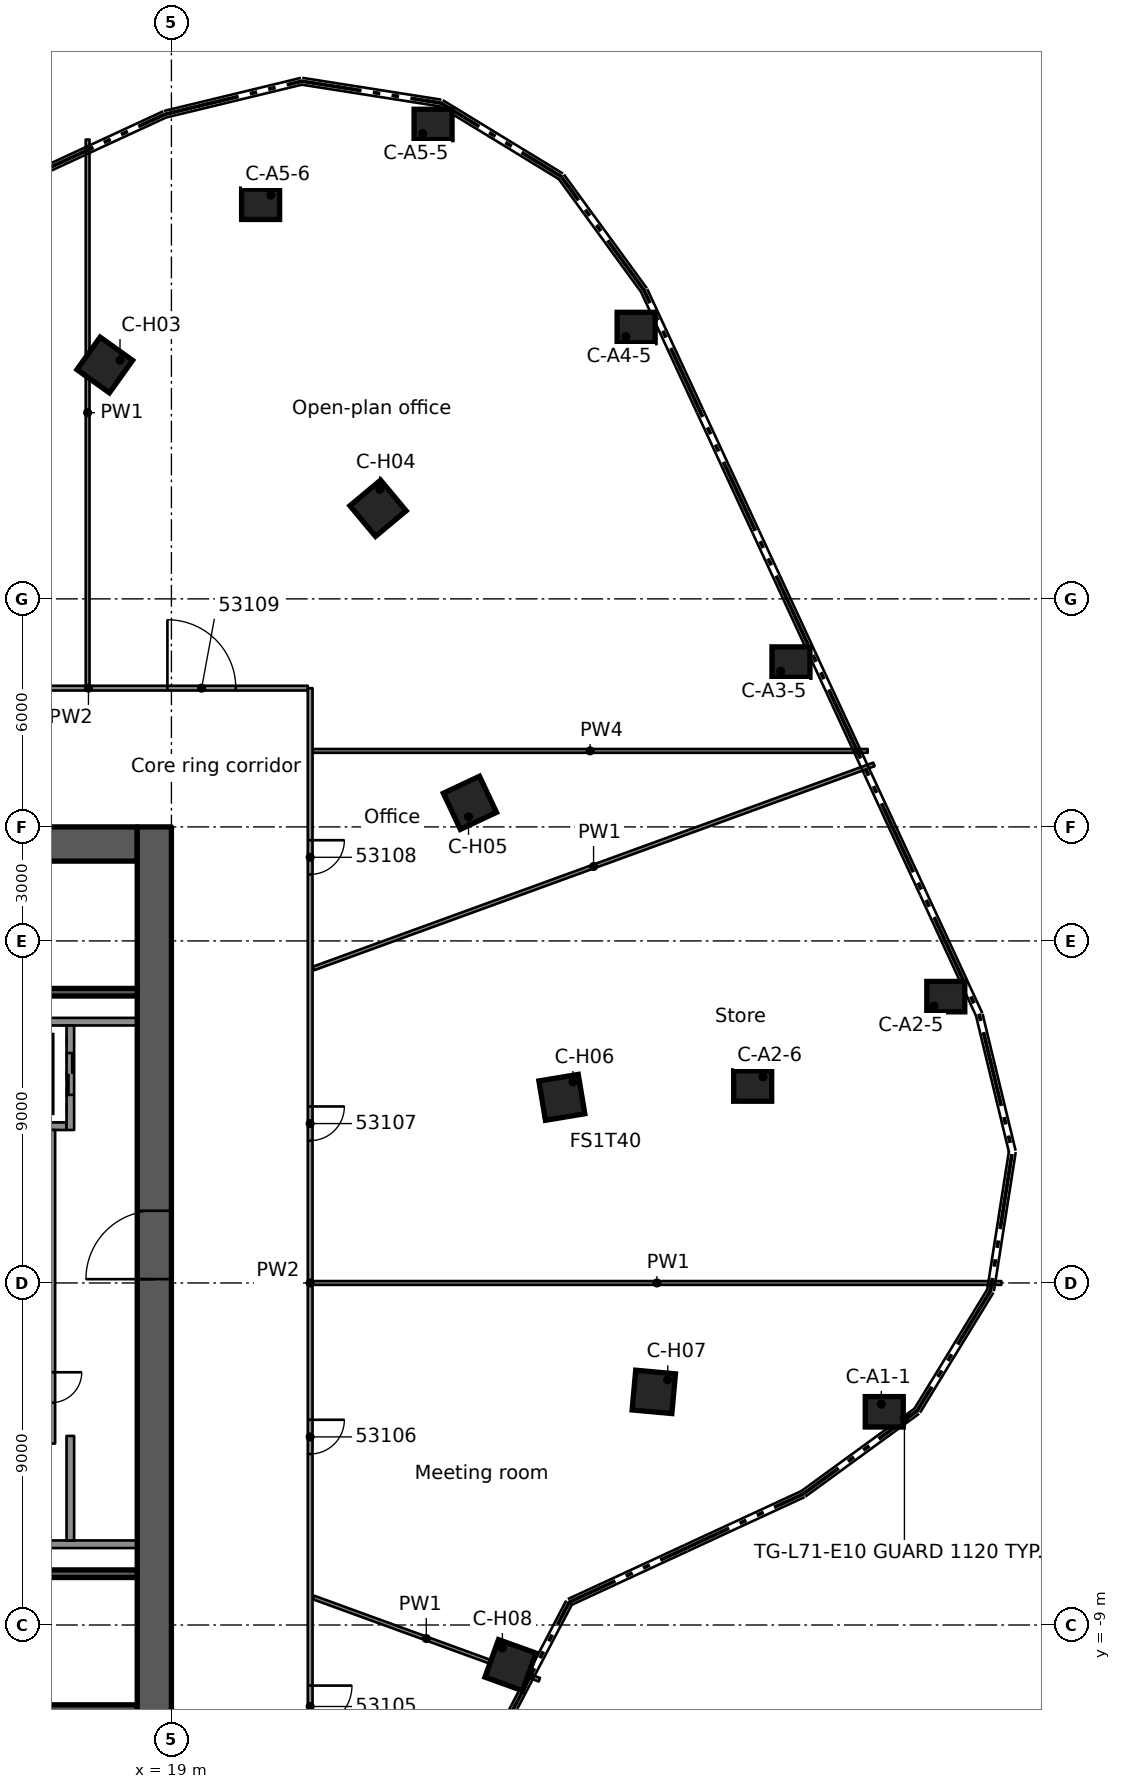
"""IFC4 building model, lengths in metres.
Left out: names, types, materials, properties, quantities, classifications, styles, units other than length and angle.
Written with IfcOpenShell. Run it as: python <this file> out.ifc"""

import sys

from ifc_helpers import new_model, si_unit, direction, frame, frame_2d, origin, origin_2d, place, context, subcontext, project, spatial, rectangle, extrude, element, fill, save


model = new_model("IFC4")
c1 = context("Model", 3, precision=1e-05, world=origin(), true_north=direction((0.0, 1.0)))
c2 = subcontext(c1, "Body", "Model", "MODEL_VIEW")
j1 = project(units=[si_unit("LENGTHUNIT", "METRE"), si_unit("PLANEANGLEUNIT", "RADIAN")], contexts=[c1])
p1 = place(None, origin())
s1 = spatial("IfcSite", under=j1, at=p1, CompositionType="ELEMENT")
p2 = place(p1, origin())
s2 = spatial("IfcBuilding", under=s1, at=p2, CompositionType="ELEMENT")
p3 = place(p2, frame((0.0, 0.0, 267.5)))
s3 = spatial("IfcBuildingStorey", under=s2, at=p3, CompositionType="ELEMENT", Elevation=267.5)
p4 = place(p3, frame((8.9, 11.55, 0.0), z_axis=(0.0, 0.0, 1.0), x_axis=(1.0, 0.0, 0.0)))
e1 = element("IfcWall", 1, at=p4, inside=s3, PredefinedType="SHEAR", context=c2, shape_type="SweptSolid", body=[
    extrude(rectangle(XDim=9.2, YDim=0.9, at=frame_2d((4.6, 0.0))), origin(), (0.0, 0.0, 1.0), 3.5),
])
p5 = place(p4, frame((0.5, 0.0, 0.0)))
e2 = element("IfcOpeningElement", 2, at=p5, cuts=e1, PredefinedType="OPENING", context=c2, shape_type="SweptSolid", body=[
    extrude(rectangle(XDim=1.8, YDim=2.1, at=frame_2d((0.9, 1.05))), frame((0.0, 0.46, 0.0), z_axis=(0.0, -1.0, 0.0), x_axis=(1.0, 0.0, 0.0)), (0.0, 0.0, 1.0), 0.92),
])
p6 = place(p4, frame((3.0, 0.0, 0.0)))
e3 = element("IfcOpeningElement", 3, at=p6, cuts=e1, PredefinedType="OPENING", context=c2, shape_type="SweptSolid", body=[
    extrude(rectangle(XDim=1.1, YDim=2.1, at=frame_2d((0.55, 1.05))), frame((0.0, 0.46, 0.0), z_axis=(0.0, -1.0, 0.0), x_axis=(1.0, 0.0, 0.0)), (0.0, 0.0, 1.0), 0.92),
])
p7 = place(p3, frame((8.9, -11.55, 0.0), z_axis=(0.0, 0.0, 1.0), x_axis=(1.0, 0.0, 0.0)))
e4 = element("IfcWall", 4, at=p7, inside=s3, PredefinedType="SHEAR", context=c2, shape_type="SweptSolid", body=[
    extrude(rectangle(XDim=9.2, YDim=0.9, at=frame_2d((4.6, 0.0))), origin(), (0.0, 0.0, 1.0), 3.5),
])
p8 = place(p7, frame((0.85, 0.0, 0.0)))
e5 = element("IfcOpeningElement", 5, at=p8, cuts=e4, PredefinedType="OPENING", context=c2, shape_type="SweptSolid", body=[
    extrude(rectangle(XDim=1.1, YDim=2.1, at=frame_2d((0.55, 1.05))), frame((0.0, 0.46, 0.0), z_axis=(0.0, -1.0, 0.0), x_axis=(1.0, 0.0, 0.0)), (0.0, 0.0, 1.0), 0.92),
])
p9 = place(p7, frame((3.0, 0.0, 0.0)))
e6 = element("IfcOpeningElement", 6, at=p9, cuts=e4, PredefinedType="OPENING", context=c2, shape_type="SweptSolid", body=[
    extrude(rectangle(XDim=1.1, YDim=2.1, at=frame_2d((0.55, 1.05))), frame((0.0, 0.46, 0.0), z_axis=(0.0, -1.0, 0.0), x_axis=(1.0, 0.0, 0.0)), (0.0, 0.0, 1.0), 0.92),
])
p10 = place(p3, frame((18.55, -12.0, 0.0), z_axis=(0.0, 0.0, 1.0), x_axis=(0.0, 1.0, 0.0)))
e7 = element("IfcWall", 7, at=p10, inside=s3, PredefinedType="SHEAR", context=c2, shape_type="SweptSolid", body=[
    extrude(rectangle(XDim=24.0, YDim=0.9, at=frame_2d((12.0, 0.0))), origin(), (0.0, 0.0, 1.0), 3.5),
])
p11 = place(p10, frame((12.1, 0.0, 0.0)))
e8 = element("IfcOpeningElement", 8, at=p11, cuts=e7, PredefinedType="OPENING", context=c2, shape_type="SweptSolid", body=[
    extrude(rectangle(XDim=1.8, YDim=2.1, at=frame_2d((0.9, 1.05))), frame((0.0, 0.46, 0.0), z_axis=(0.0, -1.0, 0.0), x_axis=(1.0, 0.0, 0.0)), (0.0, 0.0, 1.0), 0.92),
])
for number, where, z_axis, x_axis in (
    (9, (37.758, -3.39, 0.0), (0.0, 0.0, 1.0), (1.0, 0.0, 0.0)),
    (10, (39.377, 7.534, 0.0), (0.0, 0.0, 1.0), (1.0, 0.0, 0.0)),
    (11, (34.295, 5.182, 0.0), (0.0, 0.0, 1.0), (1.0, 0.0, 0.0)),
    (12, (35.303, 16.337, 0.0), (0.0, 0.0, 1.0), (1.0, 0.0, 0.0)),
    (13, (31.229, 25.14, 0.0), (0.0, 0.0, 1.0), (1.0, 0.0, 0.0)),
    (14, (25.885, 30.483, 0.0), (0.0, 0.0, 1.0), (1.0, 0.0, 0.0)),
    (15, (21.347, 28.383, 0.0), (0.0, 0.0, 1.0), (1.0, 0.0, 0.0)),
):
    element("IfcColumn", number, at=place(p3, frame(where, z_axis=z_axis, x_axis=x_axis)), inside=s3, PredefinedType="COLUMN", context=c2, shape_type="SweptSolid", body=[
        extrude(rectangle(XDim=1.0, YDim=0.8, at=origin_2d()), origin(), (0.0, 0.0, 1.0), 3.5),
    ])
for number, where, z_axis, x_axis in (
    (16, (17.246, 24.154, 0.0), (0.0, 0.0, 1.0), (0.581, 0.814, 0.0)),
    (17, (24.437, 20.384, 0.0), (0.0, 0.0, 1.0), (0.768, 0.641, 0.0)),
    (18, (26.855, 12.634, 0.0), (0.0, 0.0, 1.0), (0.905, 0.426, 0.0)),
    (19, (29.274, 4.884, 0.0), (0.0, 0.0, 1.0), (0.986, 0.165, 0.0)),
    (20, (31.693, -2.866, 0.0), (0.0, 0.0, 1.0), (0.996, -0.09, 0.0)),
    (21, (27.923, -10.056, 0.0), (0.0, 0.0, 1.0), (0.941, -0.339, 0.0)),
):
    element("IfcColumn", number, at=place(p3, frame(where, z_axis=z_axis, x_axis=x_axis)), inside=s3, PredefinedType="COLUMN", context=c2, shape_type="SweptSolid", body=[
        extrude(rectangle(XDim=1.05, YDim=1.05, at=origin_2d()), origin(), (0.0, 0.0, 1.0), 3.5),
    ])
for number, where, z_axis, x_axis in (
    (22, (11.54, -6.875, 0.0), (0.0, 0.0, 1.0), (1.0, 0.0, 0.0)),
    (23, (11.54, 6.875, 0.0), (0.0, 0.0, 1.0), (1.0, 0.0, 0.0)),
):
    element("IfcWall", number, at=place(p3, frame(where, z_axis=z_axis, x_axis=x_axis)), inside=s3, PredefinedType="SOLIDWALL", context=c2, shape_type="SweptSolid", body=[
        extrude(rectangle(XDim=6.56, YDim=0.2, at=frame_2d((3.28, 0.0))), origin(), (0.0, 0.0, 1.0), 3.05),
    ])
p12 = place(p3, frame((11.54, 4.125, 0.0), z_axis=(0.0, 0.0, 1.0), x_axis=(1.0, 0.0, 0.0)))
e24 = element("IfcWall", 24, at=p12, inside=s3, PredefinedType="SOLIDWALL", context=c2, shape_type="SweptSolid", body=[
    extrude(rectangle(XDim=4.7, YDim=0.2, at=frame_2d((2.35, 0.0))), origin(), (0.0, 0.0, 1.0), 3.05),
])
p13 = place(p3, frame((16.34, 6.775, 0.0), z_axis=(0.0, 0.0, 1.0), x_axis=(0.0, -1.0, 0.0)))
e25 = element("IfcWall", 25, at=p13, inside=s3, PredefinedType="SOLIDWALL", context=c2, shape_type="SweptSolid", body=[
    extrude(rectangle(XDim=2.75, YDim=0.2, at=frame_2d((1.375, 0.0))), origin(), (0.0, 0.0, 1.0), 3.05),
])
p14 = place(p13, frame((0.725, 0.0, 0.0)))
e26 = element("IfcOpeningElement", 26, at=p14, cuts=e25, PredefinedType="OPENING", context=c2, shape_type="SweptSolid", body=[
    extrude(rectangle(XDim=1.1, YDim=2.1, at=frame_2d((0.55, 1.05))), frame((0.0, 0.11, 0.0), z_axis=(0.0, -1.0, 0.0), x_axis=(1.0, 0.0, 0.0)), (0.0, 0.0, 1.0), 0.22),
])
p15 = place(p3, frame((15.84, 4.025, 0.0), z_axis=(0.0, 0.0, 1.0), x_axis=(0.0, -1.0, 0.0)))
e27 = element("IfcWall", 27, at=p15, inside=s3, PredefinedType="SOLIDWALL", context=c2, shape_type="SweptSolid", body=[
    extrude(rectangle(XDim=8.25, YDim=0.2, at=frame_2d((4.125, 0.0))), origin(), (0.0, 0.0, 1.0), 3.05),
])
p16 = place(p15, frame((6.375, 0.0, 0.0)))
e28 = element("IfcOpeningElement", 28, at=p16, cuts=e27, PredefinedType="OPENING", context=c2, shape_type="SweptSolid", body=[
    extrude(rectangle(XDim=0.8, YDim=2.1, at=frame_2d((0.4, 1.05))), frame((0.0, 0.11, 0.0), z_axis=(0.0, -1.0, 0.0), x_axis=(1.0, 0.0, 0.0)), (0.0, 0.0, 1.0), 0.22),
])
p17 = place(p3, frame((16.34, -4.025, 0.0), z_axis=(0.0, 0.0, 1.0), x_axis=(0.0, -1.0, 0.0)))
e29 = element("IfcWall", 29, at=p17, inside=s3, PredefinedType="SOLIDWALL", context=c2, shape_type="SweptSolid", body=[
    extrude(rectangle(XDim=2.75, YDim=0.2, at=frame_2d((1.375, 0.0))), origin(), (0.0, 0.0, 1.0), 3.05),
])
for number, where, z_axis, x_axis in (
    (30, (11.54, -7.65, 0.0), (0.0, 0.0, 1.0), (1.0, 0.0, 0.0)),
    (31, (11.54, 7.65, 0.0), (0.0, 0.0, 1.0), (1.0, 0.0, 0.0)),
):
    element("IfcWall", number, at=place(p3, frame(where, z_axis=z_axis, x_axis=x_axis)), inside=s3, PredefinedType="SOLIDWALL", context=c2, shape_type="SweptSolid", body=[
        extrude(rectangle(XDim=6.56, YDim=0.2, at=frame_2d((3.28, 0.0))), origin(), (0.0, 0.0, 1.0), 3.05),
    ])
p18 = place(p3, frame((22.731, -8.273, 0.0), z_axis=(0.0, 0.0, 1.0), x_axis=(0.939689826278, -0.342027821076, 0.0)))
e32 = element("IfcWall", 32, at=p18, inside=s3, PredefinedType="PARTITIONING", context=c2, shape_type="SweptSolid", body=[
    extrude(rectangle(XDim=6.333, YDim=0.1, at=frame_2d((3.167, 0.0))), origin(), (0.0, 0.0, 1.0), 3.03),
])
p19 = place(p3, frame((22.713, 0.0, 0.0), z_axis=(0.0, 0.0, 1.0), x_axis=(1.0, 0.0, 0.0)))
e33 = element("IfcWall", 33, at=p19, inside=s3, PredefinedType="PARTITIONING", context=c2, shape_type="SweptSolid", body=[
    extrude(rectangle(XDim=18.125, YDim=0.1, at=frame_2d((9.062, 0.0))), origin(), (0.0, 0.0, 1.0), 3.03),
])
p20 = place(p3, frame((22.713, 14.0, 0.0), z_axis=(0.0, 0.0, 1.0), x_axis=(1.0, 0.0, 0.0)))
e34 = element("IfcWall", 34, at=p20, inside=s3, PredefinedType="PARTITIONING", context=c2, shape_type="SweptSolid", body=[
    extrude(rectangle(XDim=14.608, YDim=0.1, at=frame_2d((7.304, 0.0))), origin(), (0.0, 0.0, 1.0), 2.419),
])
p21 = place(p3, frame((11.047, 15.651, 0.0), z_axis=(0.0, 0.0, 1.0), x_axis=(1.0, 0.0, 0.0)))
e35 = element("IfcWall", 35, at=p21, inside=s3, PredefinedType="PARTITIONING", context=c2, shape_type="SweptSolid", body=[
    extrude(rectangle(XDim=11.54, YDim=0.125, at=frame_2d((5.77, 0.0))), origin(), (0.0, 0.0, 1.0), 3.03),
])
p22 = place(p21, frame((7.848, 0.0, 0.0)))
e36 = element("IfcOpeningElement", 36, at=p22, cuts=e35, PredefinedType="OPENING", context=c2, shape_type="SweptSolid", body=[
    extrude(rectangle(XDim=1.8, YDim=2.1, at=frame_2d((0.9, 1.05))), frame((0.0, 0.073, 0.0), z_axis=(0.0, -1.0, 0.0), x_axis=(1.0, 0.0, 0.0)), (0.0, 0.0, 1.0), 0.145),
])
p23 = place(p21, frame((2.242, 0.0, 0.0)))
e37 = element("IfcOpeningElement", 37, at=p23, cuts=e35, PredefinedType="OPENING", context=c2, shape_type="SweptSolid", body=[
    extrude(rectangle(XDim=1.1, YDim=2.1, at=frame_2d((0.55, 1.05))), frame((0.0, 0.073, 0.0), z_axis=(0.0, -1.0, 0.0), x_axis=(1.0, 0.0, 0.0)), (0.0, 0.0, 1.0), 0.145),
])
p24 = place(p3, frame((22.731, 8.273, 0.0), z_axis=(0.0, 0.0, 1.0), x_axis=(0.939678973323, 0.342057637095, 0.0)))
e38 = element("IfcWall", 38, at=p24, inside=s3, PredefinedType="PARTITIONING", context=c2, shape_type="SweptSolid", body=[
    extrude(rectangle(XDim=15.702, YDim=0.1, at=frame_2d((7.851, 0.0))), origin(), (0.0, 0.0, 1.0), 3.03),
])
p25 = place(p3, frame((22.651, 15.65, 0.0), z_axis=(0.0, 0.0, 1.0), x_axis=(0.0, -1.0, 0.0)))
e39 = element("IfcWall", 39, at=p25, inside=s3, PredefinedType="PARTITIONING", context=c2, shape_type="SweptSolid", body=[
    extrude(rectangle(XDim=31.3, YDim=0.125, at=frame_2d((15.65, 0.0))), origin(), (0.0, 0.0, 1.0), 3.03),
])
p26 = place(p25, frame((26.244, 0.0, 0.0)))
e40 = element("IfcOpeningElement", 40, at=p26, cuts=e39, PredefinedType="OPENING", context=c2, shape_type="SweptSolid", body=[
    extrude(rectangle(XDim=1.1, YDim=2.1, at=frame_2d((0.55, 1.05))), frame((0.0, 0.073, 0.0), z_axis=(0.0, -1.0, 0.0), x_axis=(1.0, 0.0, 0.0)), (0.0, 0.0, 1.0), 0.145),
])
p27 = place(p25, frame((19.25, 0.0, 0.0)))
e41 = element("IfcOpeningElement", 41, at=p27, cuts=e39, PredefinedType="OPENING", context=c2, shape_type="SweptSolid", body=[
    extrude(rectangle(XDim=0.9, YDim=2.1, at=frame_2d((0.45, 1.05))), frame((0.0, 0.073, 0.0), z_axis=(0.0, -1.0, 0.0), x_axis=(1.0, 0.0, 0.0)), (0.0, 0.0, 1.0), 0.145),
])
p28 = place(p25, frame((11.006, 0.0, 0.0)))
e42 = element("IfcOpeningElement", 42, at=p28, cuts=e39, PredefinedType="OPENING", context=c2, shape_type="SweptSolid", body=[
    extrude(rectangle(XDim=0.9, YDim=2.1, at=frame_2d((0.45, 1.05))), frame((0.0, 0.073, 0.0), z_axis=(0.0, -1.0, 0.0), x_axis=(1.0, 0.0, 0.0)), (0.0, 0.0, 1.0), 0.145),
])
p29 = place(p25, frame((4.0, 0.0, 0.0)))
e43 = element("IfcOpeningElement", 43, at=p29, cuts=e39, PredefinedType="OPENING", context=c2, shape_type="SweptSolid", body=[
    extrude(rectangle(XDim=0.9, YDim=2.1, at=frame_2d((0.45, 1.05))), frame((0.0, 0.073, 0.0), z_axis=(0.0, -1.0, 0.0), x_axis=(1.0, 0.0, 0.0)), (0.0, 0.0, 1.0), 0.145),
])
p30 = place(p3, frame((16.795, 15.713, 0.0), z_axis=(0.0, 0.0, 1.0), x_axis=(0.0, 1.0, 0.0)))
e44 = element("IfcWall", 44, at=p30, inside=s3, PredefinedType="PARTITIONING", context=c2, shape_type="SweptSolid", body=[
    extrude(rectangle(XDim=14.373, YDim=0.1, at=frame_2d((7.187, 0.0))), origin(), (0.0, 0.0, 1.0), 3.03),
])
p31 = place(p14, origin())
e45 = element("IfcDoor", 45, at=p31, inside=s3, OperationType="DOUBLE_DOOR_SLIDING", PredefinedType="DOOR", context=c2, shape_type="SweptSolid", body=[
    extrude(rectangle(XDim=1.1, YDim=2.1, at=frame_2d((0.55, 1.05))), frame((0.0, 0.025, 0.0), z_axis=(0.0, -1.0, 0.0), x_axis=(1.0, 0.0, 0.0)), (0.0, 0.0, 1.0), 0.05),
])
fill(e26, e45)
p32 = place(p11, origin())
e46 = element("IfcDoor", 46, at=p32, inside=s3, OperationType="SINGLE_SWING_RIGHT", PredefinedType="DOOR", context=c2, shape_type="SweptSolid", body=[
    extrude(rectangle(XDim=1.8, YDim=2.1, at=frame_2d((0.9, 1.05))), frame((0.0, 0.025, 0.0), z_axis=(0.0, -1.0, 0.0), x_axis=(1.0, 0.0, 0.0)), (0.0, 0.0, 1.0), 0.05),
])
fill(e8, e46)
p33 = place(p26, origin())
e47 = element("IfcDoor", 47, at=p33, inside=s3, OperationType="SINGLE_SWING_RIGHT", PredefinedType="DOOR", context=c2, shape_type="SweptSolid", body=[
    extrude(rectangle(XDim=1.1, YDim=2.1, at=frame_2d((0.55, 1.05))), frame((0.0, 0.025, 0.0), z_axis=(0.0, -1.0, 0.0), x_axis=(1.0, 0.0, 0.0)), (0.0, 0.0, 1.0), 0.05),
])
fill(e40, e47)
p34 = place(p27, origin())
e48 = element("IfcDoor", 48, at=p34, inside=s3, OperationType="SINGLE_SWING_RIGHT", PredefinedType="DOOR", context=c2, shape_type="SweptSolid", body=[
    extrude(rectangle(XDim=0.9, YDim=2.1, at=frame_2d((0.45, 1.05))), frame((0.0, 0.025, 0.0), z_axis=(0.0, -1.0, 0.0), x_axis=(1.0, 0.0, 0.0)), (0.0, 0.0, 1.0), 0.05),
])
fill(e41, e48)
p35 = place(p28, origin())
e49 = element("IfcDoor", 49, at=p35, inside=s3, OperationType="SINGLE_SWING_LEFT", PredefinedType="DOOR", context=c2, shape_type="SweptSolid", body=[
    extrude(rectangle(XDim=0.9, YDim=2.1, at=frame_2d((0.45, 1.05))), frame((0.0, 0.025, 0.0), z_axis=(0.0, -1.0, 0.0), x_axis=(1.0, 0.0, 0.0)), (0.0, 0.0, 1.0), 0.05),
])
fill(e42, e49)
p36 = place(p29, origin())
e50 = element("IfcDoor", 50, at=p36, inside=s3, OperationType="SINGLE_SWING_LEFT", PredefinedType="DOOR", context=c2, shape_type="SweptSolid", body=[
    extrude(rectangle(XDim=0.9, YDim=2.1, at=frame_2d((0.45, 1.05))), frame((0.0, 0.025, 0.0), z_axis=(0.0, -1.0, 0.0), x_axis=(1.0, 0.0, 0.0)), (0.0, 0.0, 1.0), 0.05),
])
fill(e43, e50)
p37 = place(p22, origin())
e51 = element("IfcDoor", 51, at=p37, inside=s3, OperationType="DOUBLE_DOOR_SINGLE_SWING", PredefinedType="DOOR", context=c2, shape_type="SweptSolid", body=[
    extrude(rectangle(XDim=1.8, YDim=2.1, at=frame_2d((0.9, 1.05))), frame((0.0, 0.025, 0.0), z_axis=(0.0, -1.0, 0.0), x_axis=(1.0, 0.0, 0.0)), (0.0, 0.0, 1.0), 0.05),
])
fill(e36, e51)
save(model, sys.argv[1])
